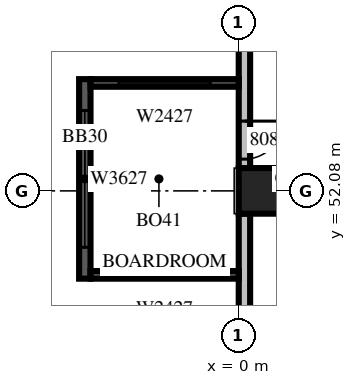
"""IFC4 building model, lengths in metres.
Left out: names, types, materials, properties, quantities, classifications, styles, units other than length and angle.
Written with IfcOpenShell. Run it as: python <this file> out.ifc"""

import sys

from ifc_helpers import new_model, si_unit, direction, frame, frame_2d, origin, origin_2d, place, context, subcontext, project, spatial, rectangle, extrude, source, transform, mapped, element, fill, save


model = new_model("IFC4")
c1 = context("Model", 3, precision=1e-05, world=origin(), true_north=direction((0.0, 1.0)))
c2 = subcontext(c1, "Body", "Model", "MODEL_VIEW")
j1 = project(units=[si_unit("LENGTHUNIT", "METRE"), si_unit("PLANEANGLEUNIT", "RADIAN")], contexts=[c1])
p1 = place(None, origin())
s1 = spatial("IfcSite", under=j1, at=p1, CompositionType="ELEMENT")
p2 = place(p1, origin())
s2 = spatial("IfcBuilding", under=s1, at=p2, CompositionType="ELEMENT")
p3 = place(p2, frame((0.0, 0.0, 44.7)))
s3 = spatial("IfcBuildingStorey", under=s2, at=p3, CompositionType="ELEMENT", Elevation=44.7)
m1 = source(origin(), c2, "Body", "SweptSolid", [
    extrude(rectangle(XDim=1.2, YDim=1.2, at=origin_2d()), origin(), (0.0, 0.0, 1.0), 4.2),
])
p4 = place(p3, frame((0.6, 52.08, 0.0), z_axis=(0.0, 0.0, 1.0), x_axis=(1.0, 0.0, 0.0)))
e1 = element("IfcColumn", 1, at=p4, inside=s3, PredefinedType="COLUMN", context=c2, shape_type="MappedRepresentation", body=[
    mapped(m1, transform((0.0, 0.0, 0.0), scale=1.0)),
])
m2 = source(origin(), c2, "Body", "SweptSolid", [
    extrude(rectangle(XDim=4.68, YDim=0.3, at=frame_2d((2.34, 0.0))), origin(), (0.0, 0.0, 1.0), 3.8),
])
p5 = place(p3, frame((0.15, 57.36, 0.0), z_axis=(0.0, 0.0, 1.0), x_axis=(0.0, -1.0, 0.0)))
e2 = element("IfcWall", 2, at=p5, inside=s3, PredefinedType="STANDARD", context=c2, shape_type="MappedRepresentation", body=[
    mapped(m2, transform((0.0, 0.0, 0.0), scale=1.0)),
])
m3 = source(origin(), c2, "Body", "SweptSolid", [
    extrude(rectangle(XDim=1.2, YDim=2.7, at=frame_2d((0.6, 1.35))), frame((0.0, 0.16, 0.0), z_axis=(0.0, -1.0, 0.0), x_axis=(1.0, 0.0, 0.0)), (0.0, 0.0, 1.0), 0.32),
])
p6 = place(p5, frame((0.165, 0.0, 0.6)))
e3 = element("IfcOpeningElement", 3, at=p6, cuts=e2, PredefinedType="OPENING", context=c2, shape_type="MappedRepresentation", body=[
    mapped(m3, transform((0.0, 0.0, 0.0), scale=1.0)),
])
m4 = source(origin(), c2, "Body", "SweptSolid", [
    extrude(rectangle(XDim=1.0, YDim=2.1, at=frame_2d((0.5, 1.05))), frame((0.0, 0.16, 0.0), z_axis=(0.0, -1.0, 0.0), x_axis=(1.0, 0.0, 0.0)), (0.0, 0.0, 1.0), 0.32),
])
p7 = place(p5, frame((3.444, 0.0, 0.0)))
e4 = element("IfcOpeningElement", 4, at=p7, cuts=e2, PredefinedType="OPENING", context=c2, shape_type="MappedRepresentation", body=[
    mapped(m4, transform((0.0, 0.0, 0.0), scale=1.0)),
])
p8 = place(p3, frame((0.15, 51.48, 0.0), z_axis=(0.0, 0.0, 1.0), x_axis=(0.0, -1.0, 0.0)))
e5 = element("IfcWall", 5, at=p8, inside=s3, PredefinedType="STANDARD", context=c2, shape_type="MappedRepresentation", body=[
    mapped(m2, transform((0.0, 0.0, 0.0), scale=1.0)),
])
p9 = place(p3, frame((-4.05, 55.02, 0.0), z_axis=(0.0, 0.0, 1.0), x_axis=(0.0, -1.0, 0.0)))
e6 = element("IfcWall", 6, at=p9, inside=s3, PredefinedType="SOLIDWALL", context=c2, shape_type="SweptSolid", body=[
    extrude(rectangle(XDim=5.25, YDim=0.3, at=frame_2d((2.625, 0.0))), origin(), (0.0, 0.0, 1.0), 3.79),
])
m5 = source(origin(), c2, "Body", "SweptSolid", [
    extrude(rectangle(XDim=3.6, YDim=2.7, at=frame_2d((1.8, 1.35))), frame((0.0, 0.16, 0.0), z_axis=(0.0, -1.0, 0.0), x_axis=(1.0, 0.0, 0.0)), (0.0, 0.0, 1.0), 0.32),
])
p10 = place(p9, frame((0.825, 0.0, 0.6)))
e7 = element("IfcOpeningElement", 7, at=p10, cuts=e6, PredefinedType="OPENING", context=c2, shape_type="MappedRepresentation", body=[
    mapped(m5, transform((0.0, 0.0, 0.0), scale=1.0)),
])
m6 = source(origin(), c2, "Body", "SweptSolid", [
    extrude(rectangle(XDim=3.9, YDim=0.2, at=frame_2d((1.95, 0.0))), origin(), (0.0, 0.0, 1.0), 3.79),
])
p11 = place(p3, frame((0.0, 54.92, 0.0), z_axis=(0.0, 0.0, 1.0), x_axis=(-1.0, 0.0, 0.0)))
e8 = element("IfcWall", 8, at=p11, inside=s3, PredefinedType="SOLIDWALL", context=c2, shape_type="MappedRepresentation", body=[
    mapped(m6, transform((0.0, 0.0, 0.0), scale=1.0)),
])
m7 = source(origin(), c2, "Body", "SweptSolid", [
    extrude(rectangle(XDim=2.4, YDim=2.7, at=frame_2d((1.2, 1.35))), frame((0.0, 0.11, 0.0), z_axis=(0.0, -1.0, 0.0), x_axis=(1.0, 0.0, 0.0)), (0.0, 0.0, 1.0), 0.22),
])
p12 = place(p11, frame((0.75, 0.0, 0.6)))
e9 = element("IfcOpeningElement", 9, at=p12, cuts=e8, PredefinedType="OPENING", context=c2, shape_type="MappedRepresentation", body=[
    mapped(m7, transform((0.0, 0.0, 0.0), scale=1.0)),
])
p13 = place(p3, frame((0.0, 49.87, 0.0), z_axis=(0.0, 0.0, 1.0), x_axis=(-1.0, 0.0, 0.0)))
e10 = element("IfcWall", 10, at=p13, inside=s3, PredefinedType="SOLIDWALL", context=c2, shape_type="MappedRepresentation", body=[
    mapped(m6, transform((0.0, 0.0, 0.0), scale=1.0)),
])
p14 = place(p13, frame((0.75, 0.0, 0.6)))
e11 = element("IfcOpeningElement", 11, at=p14, cuts=e10, PredefinedType="OPENING", context=c2, shape_type="MappedRepresentation", body=[
    mapped(m7, transform((0.0, 0.0, 0.0), scale=1.0)),
])
m8 = source(origin(), c2, "Body", "SweptSolid", [
    extrude(rectangle(XDim=3.6, YDim=2.7, at=frame_2d((1.8, 1.35))), frame((0.0, 0.03, 0.0), z_axis=(0.0, -1.0, 0.0), x_axis=(1.0, 0.0, 0.0)), (0.0, 0.0, 1.0), 0.06),
])
p15 = place(p10, origin())
e12 = element("IfcWindow", 12, at=p15, inside=s3, PartitioningType="SINGLE_PANEL", PredefinedType="WINDOW", context=c2, shape_type="MappedRepresentation", body=[
    mapped(m8, transform((0.0, 0.0, 0.0), scale=1.0)),
])
fill(e7, e12)
m9 = source(origin(), c2, "Body", "SweptSolid", [
    extrude(rectangle(XDim=2.4, YDim=2.7, at=frame_2d((1.2, 1.35))), frame((0.0, 0.03, 0.0), z_axis=(0.0, -1.0, 0.0), x_axis=(1.0, 0.0, 0.0)), (0.0, 0.0, 1.0), 0.06),
])
p16 = place(p12, origin())
e13 = element("IfcWindow", 13, at=p16, inside=s3, PartitioningType="SINGLE_PANEL", PredefinedType="WINDOW", context=c2, shape_type="MappedRepresentation", body=[
    mapped(m9, transform((0.0, 0.0, 0.0), scale=1.0)),
])
fill(e9, e13)
p17 = place(p14, origin())
e14 = element("IfcWindow", 14, at=p17, inside=s3, PartitioningType="SINGLE_PANEL", PredefinedType="WINDOW", context=c2, shape_type="MappedRepresentation", body=[
    mapped(m9, transform((0.0, 0.0, 0.0), scale=1.0)),
])
fill(e11, e14)
m10 = source(origin(), c2, "Body", "SweptSolid", [
    extrude(rectangle(XDim=1.0, YDim=2.1, at=frame_2d((0.5, 1.05))), frame((0.0, 0.025, 0.0), z_axis=(0.0, -1.0, 0.0), x_axis=(1.0, 0.0, 0.0)), (0.0, 0.0, 1.0), 0.05),
])
p18 = place(p7, origin())
e15 = element("IfcDoor", 15, at=p18, inside=s3, OperationType="SINGLE_SWING_LEFT", PredefinedType="DOOR", context=c2, shape_type="MappedRepresentation", body=[
    mapped(m10, transform((0.0, 0.0, 0.0), scale=1.0)),
])
fill(e4, e15)
save(model, sys.argv[1])
